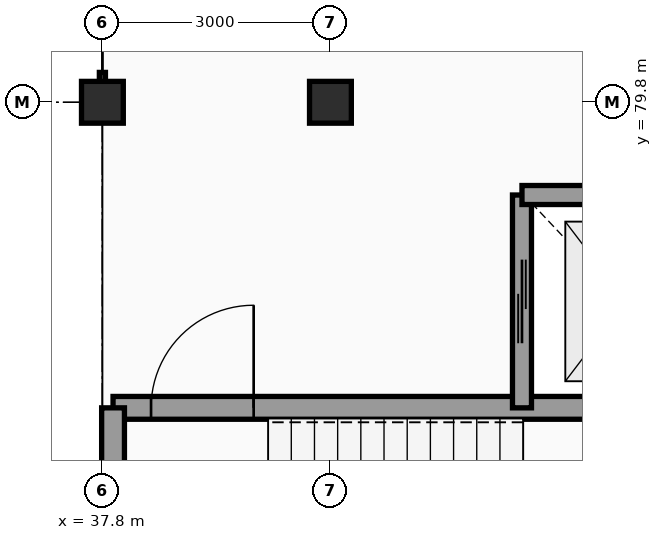
"""IFC4 building model, lengths in metres.
Left out: names, types, materials, properties, quantities, classifications, styles, units other than length and angle.
Written with IfcOpenShell. Run it as: python <this file> out.ifc"""

import sys

from ifc_helpers import new_model, si_unit, direction, frame, frame_2d, origin, origin_2d, place, context, subcontext, project, spatial, rectangle, extrude, element, fill, save


model = new_model("IFC4")
c1 = context("Model", 3, precision=1e-05, world=origin(), true_north=direction((0.0, 1.0)))
c2 = subcontext(c1, "Body", "Model", "MODEL_VIEW")
j1 = project(units=[si_unit("LENGTHUNIT", "METRE"), si_unit("PLANEANGLEUNIT", "RADIAN")], contexts=[c1])
p1 = place(None, origin())
s1 = spatial("IfcSite", under=j1, at=p1, CompositionType="ELEMENT")
p2 = place(p1, origin())
s2 = spatial("IfcBuilding", under=s1, at=p2, CompositionType="ELEMENT")
p3 = place(p2, frame((0.0, 0.0, 11.4)))
s3 = spatial("IfcBuildingStorey", under=s2, at=p3, CompositionType="ELEMENT", Elevation=11.4)
for number, where, z_axis, x_axis in (
    (1, (37.8, 79.8, 0.0), (0.0, 0.0, 1.0), (1.0, 0.0, 0.0)),
    (2, (40.8, 79.8, 0.0), (0.0, 0.0, 1.0), (1.0, 0.0, 0.0)),
):
    element("IfcColumn", number, at=place(p3, frame(where, z_axis=z_axis, x_axis=x_axis)), inside=s3, PredefinedType="COLUMN", context=c2, shape_type="SweptSolid", body=[
        extrude(rectangle(XDim=0.55, YDim=0.55, at=origin_2d()), origin(), (0.0, 0.0, 1.0), 3.6),
    ])
p4 = place(p3, frame((46.06, 75.78, 0.0), z_axis=(0.0, 0.0, 1.0), x_axis=(-1.0, 0.0, 0.0)))
e3 = element("IfcWall", 3, at=p4, inside=s3, PredefinedType="SHEAR", context=c2, shape_type="SweptSolid", body=[
    extrude(rectangle(XDim=8.12, YDim=0.3, at=frame_2d((4.06, 0.0))), origin(), (0.0, 0.0, 1.0), 3.6),
])
p5 = place(p4, frame((6.27, 0.0, 0.0)))
e4 = element("IfcOpeningElement", 4, at=p5, cuts=e3, PredefinedType="OPENING", context=c2, shape_type="SweptSolid", body=[
    extrude(rectangle(XDim=1.35, YDim=2.15, at=frame_2d((0.675, 1.075))), frame((0.0, 0.16, 0.0), z_axis=(0.0, -1.0, 0.0), x_axis=(1.0, 0.0, 0.0)), (0.0, 0.0, 1.0), 0.32),
])
p6 = place(p3, frame((37.94, 75.78, 0.0), z_axis=(0.0, 0.0, 1.0), x_axis=(0.0, -1.0, 0.0)))
e5 = element("IfcWall", 5, at=p6, inside=s3, PredefinedType="SHEAR", context=c2, shape_type="SweptSolid", body=[
    extrude(rectangle(XDim=4.24, YDim=0.3, at=frame_2d((2.12, 0.0))), origin(), (0.0, 0.0, 1.0), 3.6),
])
p7 = place(p3, frame((43.32, 78.58, 0.0), z_axis=(0.0, 0.0, 1.0), x_axis=(0.0, -1.0, 0.0)))
e6 = element("IfcWall", 6, at=p7, inside=s3, PredefinedType="SHEAR", context=c2, shape_type="SweptSolid", body=[
    extrude(rectangle(XDim=2.8, YDim=0.25, at=frame_2d((1.4, 0.0))), origin(), (0.0, 0.0, 1.0), 3.6),
])
p8 = place(p7, frame((0.85, 0.0, 0.0)))
e7 = element("IfcOpeningElement", 7, at=p8, cuts=e6, PredefinedType="OPENING", context=c2, shape_type="SweptSolid", body=[
    extrude(rectangle(XDim=1.1, YDim=2.15, at=frame_2d((0.55, 1.075))), frame((0.0, 0.135, 0.0), z_axis=(0.0, -1.0, 0.0), x_axis=(1.0, 0.0, 0.0)), (0.0, 0.0, 1.0), 0.27),
])
p9 = place(p3, frame((46.06, 78.58, 0.0), z_axis=(0.0, 0.0, 1.0), x_axis=(-1.0, 0.0, 0.0)))
e8 = element("IfcWall", 8, at=p9, inside=s3, PredefinedType="SHEAR", context=c2, shape_type="SweptSolid", body=[
    extrude(rectangle(XDim=2.74, YDim=0.25, at=frame_2d((1.37, 0.0))), origin(), (0.0, 0.0, 1.0), 3.6),
])
p10 = place(p5, frame((1.35, 0.0, 0.0), z_axis=(0.0, 0.0, 1.0), x_axis=(-1.0, 0.0, 0.0)))
e9 = element("IfcDoor", 9, at=p10, inside=s3, OperationType="SINGLE_SWING_LEFT", PredefinedType="DOOR", context=c2, shape_type="SweptSolid", body=[
    extrude(rectangle(XDim=1.35, YDim=2.15, at=frame_2d((0.675, 1.075))), frame((0.0, 0.025, 0.0), z_axis=(0.0, -1.0, 0.0), x_axis=(1.0, 0.0, 0.0)), (0.0, 0.0, 1.0), 0.05),
])
fill(e4, e9)
p11 = place(p8, origin())
e10 = element("IfcDoor", 10, at=p11, inside=s3, OperationType="DOUBLE_DOOR_SLIDING", PredefinedType="DOOR", context=c2, shape_type="SweptSolid", body=[
    extrude(rectangle(XDim=1.1, YDim=2.15, at=frame_2d((0.55, 1.075))), frame((0.0, 0.025, 0.0), z_axis=(0.0, -1.0, 0.0), x_axis=(1.0, 0.0, 0.0)), (0.0, 0.0, 1.0), 0.05),
])
fill(e7, e10)
save(model, sys.argv[1])
